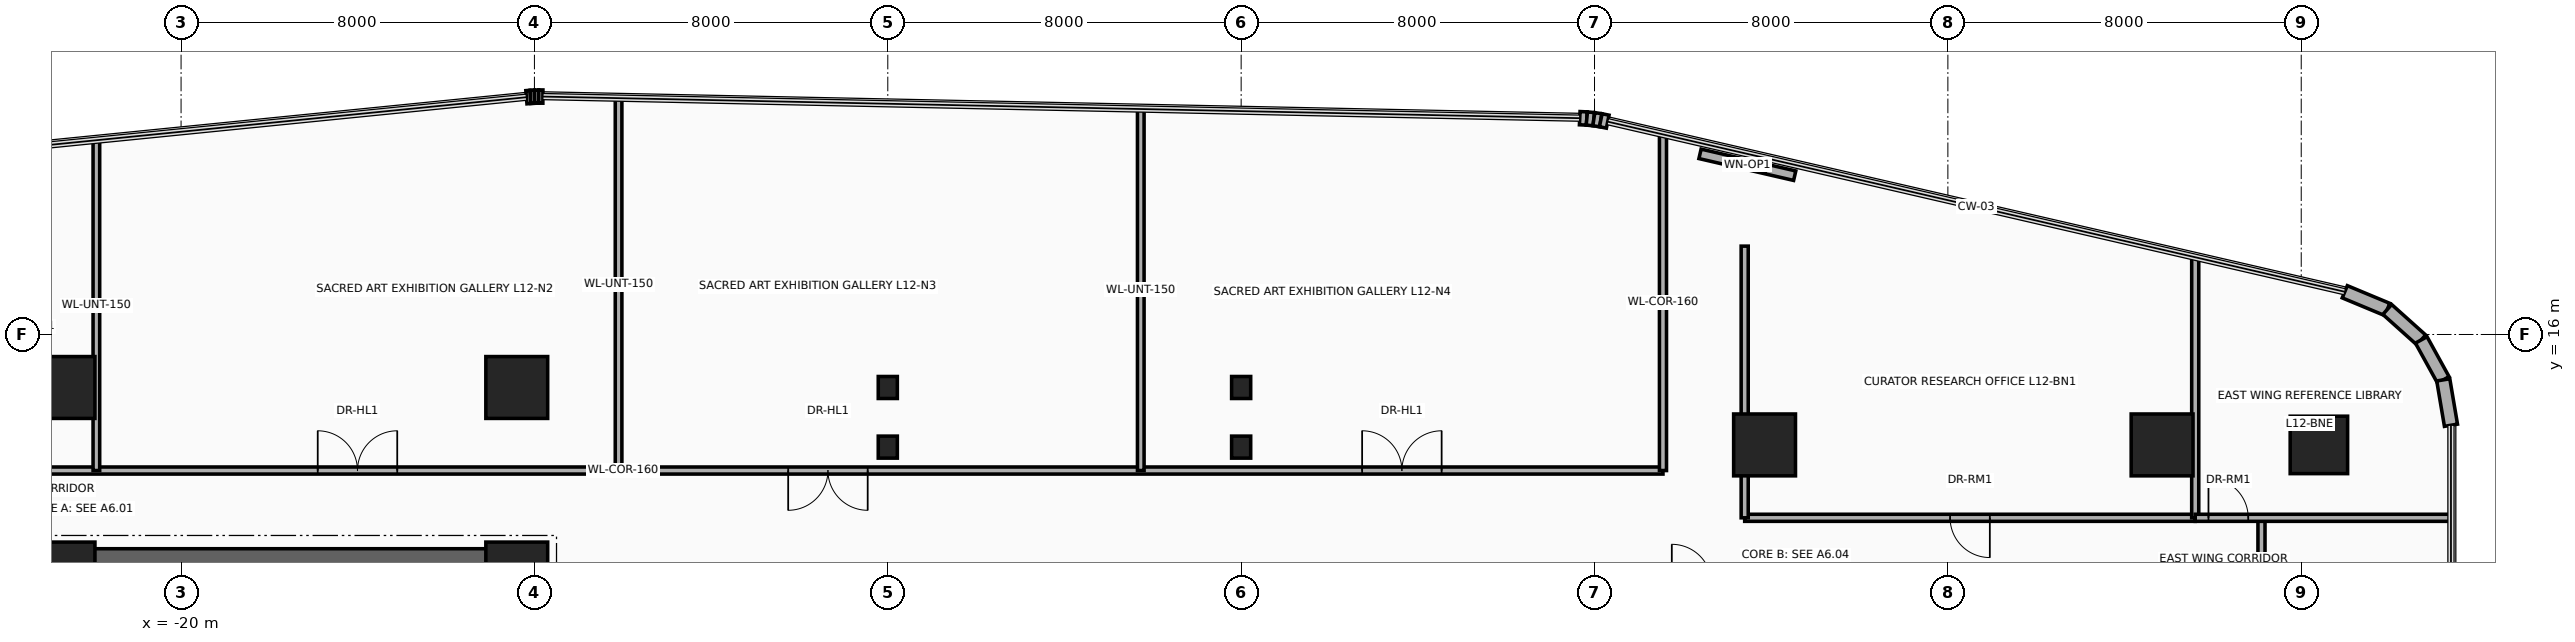
"""IFC4 building model, lengths in metres.
Left out: names, types, materials, properties, quantities, classifications, styles, units other than length and angle.
Written with IfcOpenShell. Run it as: python <this file> out.ifc"""

import sys

from ifc_helpers import new_model, si_unit, direction, frame, frame_2d, origin, origin_2d, place, context, subcontext, project, spatial, rectangle, circle, i_section, extrude, source, transform, mapped, element, fill, save


model = new_model("IFC4")
c1 = context("Model", 3, precision=1e-05, world=origin(), true_north=direction((0.0, 1.0)))
c2 = subcontext(c1, "Body", "Model", "MODEL_VIEW")
j1 = project(units=[si_unit("LENGTHUNIT", "METRE"), si_unit("PLANEANGLEUNIT", "RADIAN")], contexts=[c1])
p1 = place(None, origin())
s1 = spatial("IfcSite", under=j1, at=p1, CompositionType="ELEMENT")
p2 = place(p1, origin())
s2 = spatial("IfcBuilding", under=s1, at=p2, CompositionType="ELEMENT")
p3 = place(p2, frame((0.0, 0.0, 51.9)))
s3 = spatial("IfcBuildingStorey", under=s2, at=p3, CompositionType="ELEMENT", Elevation=51.9)
p4 = place(p3, frame((-22.65, -11.15, 0.0), z_axis=(0.0, 0.0, 1.0), x_axis=(0.0, 1.0, 0.0)))
e1 = element("IfcWall", 1, at=p4, inside=s3, PredefinedType="SHEAR", context=c2, shape_type="SweptSolid", body=[
    extrude(rectangle(XDim=22.3, YDim=0.7, at=frame_2d((11.15, 0.0))), origin(), (0.0, 0.0, 1.0), 3.46),
])
p5 = place(p3, frame((-22.65, 10.8, 0.0), z_axis=(0.0, 0.0, 1.0), x_axis=(1.0, 0.0, 0.0)))
e2 = element("IfcWall", 2, at=p5, inside=s3, PredefinedType="SHEAR", context=c2, shape_type="SweptSolid", body=[
    extrude(rectangle(XDim=10.25, YDim=0.7, at=frame_2d((5.125, 0.0))), origin(), (0.0, 0.0, 1.0), 3.46),
])
m1 = source(origin(), c2, "Body", "SweptSolid", [
    extrude(rectangle(XDim=1.4, YDim=1.4, at=origin_2d()), origin(), (0.0, 0.0, 1.0), 3.7),
])
for number, where, z_axis, x_axis in (
    (3, (-22.65, 10.6, 0.0), (0.0, 0.0, 1.0), (1.0, 0.0, 0.0)),
    (4, (-12.4, 10.6, 0.0), (0.0, 0.0, 1.0), (1.0, 0.0, 0.0)),
    (5, (-22.65, 14.8, 0.0), (0.0, 0.0, 1.0), (1.0, 0.0, 0.0)),
    (6, (-12.4, 14.8, 0.0), (0.0, 0.0, 1.0), (1.0, 0.0, 0.0)),
    (7, (15.85, 13.5, 0.0), (0.0, 0.0, 1.0), (1.0, 0.0, 0.0)),
    (8, (24.85, 13.5, 0.0), (0.0, 0.0, 1.0), (1.0, 0.0, 0.0)),
):
    element("IfcColumn", number, at=place(p3, frame(where, z_axis=z_axis, x_axis=x_axis)), inside=s3, PredefinedType="COLUMN", context=c2, shape_type="MappedRepresentation", body=[
        mapped(m1, transform((0.0, 0.0, 0.0), x_axis=(1.0, 0.0, 0.0), y_axis=(0.0, 1.0, 0.0), z_axis=(0.0, 0.0, 1.0), scale=1.0)),
    ])
m2 = source(origin(), c2, "Body", "SweptSolid", [
    extrude(circle(Radius=0.65, at=origin_2d()), origin(), (0.0, 0.0, 1.0), 3.7),
])
p6 = place(p3, frame((28.4, 13.5, 0.0), z_axis=(0.0, 0.0, 1.0), x_axis=(1.0, 0.0, 0.0)))
e9 = element("IfcColumn", 9, at=p6, inside=s3, PredefinedType="COLUMN", context=c2, shape_type="MappedRepresentation", body=[
    mapped(m2, transform((0.0, 0.0, 0.0), x_axis=(1.0, 0.0, 0.0), y_axis=(0.0, 1.0, 0.0), z_axis=(0.0, 0.0, 1.0), scale=1.0)),
])
m3 = source(origin(), c2, "Body", "SweptSolid", [
    extrude(i_section(OverallWidth=0.432, OverallDepth=0.498, WebThickness=0.056, FlangeThickness=0.089, at=origin_2d()), origin(), (0.0, 0.0, 1.0), 3.7),
])
for number, where, z_axis, x_axis in (
    (10, (-4.0, 13.45, 0.0), (0.0, 0.0, 1.0), (1.0, 0.0, 0.0)),
    (11, (-4.0, 14.8, 0.0), (0.0, 0.0, 1.0), (1.0, 0.0, 0.0)),
    (12, (4.0, 13.45, 0.0), (0.0, 0.0, 1.0), (1.0, 0.0, 0.0)),
    (13, (4.0, 14.8, 0.0), (0.0, 0.0, 1.0), (1.0, 0.0, 0.0)),
):
    element("IfcColumn", number, at=place(p3, frame(where, z_axis=z_axis, x_axis=x_axis)), inside=s3, PredefinedType="COLUMN", context=c2, shape_type="MappedRepresentation", body=[
        mapped(m3, transform((0.0, 0.0, 0.0), x_axis=(1.0, 0.0, 0.0), y_axis=(0.0, 1.0, 0.0), z_axis=(0.0, 0.0, 1.0), scale=1.0)),
    ])
p7 = place(p3, frame((-12.182, 21.371, 0.0), z_axis=(0.0, 0.0, 1.0), x_axis=(0.996527790842, 0.08326080759, 0.0)))
e14 = element("IfcWall", 14, at=p7, inside=s3, PredefinedType="SOLIDWALL", context=c2, shape_type="SweptSolid", body=[
    extrude(rectangle(XDim=0.094, YDim=0.3, at=frame_2d((0.047, 0.0))), origin(), (0.0, 0.0, 1.0), 3.46),
])
p8 = place(p3, frame((-12.088, 21.379, 0.0), z_axis=(0.0, 0.0, 1.0), x_axis=(0.998476480444, 0.055178963393, 0.0)))
e15 = element("IfcWall", 15, at=p8, inside=s3, PredefinedType="SOLIDWALL", context=c2, shape_type="SweptSolid", body=[
    extrude(rectangle(XDim=0.093, YDim=0.3, at=frame_2d((0.046, 0.0))), origin(), (0.0, 0.0, 1.0), 3.46),
])
p9 = place(p3, frame((-11.996, 21.384, 0.0), z_axis=(0.0, 0.0, 1.0), x_axis=(0.999722573757, 0.023553673204, 0.0)))
e16 = element("IfcWall", 16, at=p9, inside=s3, PredefinedType="SOLIDWALL", context=c2, shape_type="SweptSolid", body=[
    extrude(rectangle(XDim=0.093, YDim=0.3, at=frame_2d((0.047, 0.0))), origin(), (0.0, 0.0, 1.0), 3.46),
])
p10 = place(p3, frame((-11.902, 21.386, 0.0), z_axis=(0.0, 0.0, 1.0), x_axis=(0.999986507273, -0.005194735103, 0.0)))
e17 = element("IfcWall", 17, at=p10, inside=s3, PredefinedType="SOLIDWALL", context=c2, shape_type="SweptSolid", body=[
    extrude(rectangle(XDim=0.094, YDim=0.3, at=frame_2d((0.047, 0.0))), origin(), (0.0, 0.0, 1.0), 3.46),
])
p11 = place(p3, frame((11.666, 20.897, 0.0), z_axis=(0.0, 0.0, 1.0), x_axis=(0.998885297239, -0.047203421059, 0.0)))
e18 = element("IfcWall", 18, at=p11, inside=s3, PredefinedType="SOLIDWALL", context=c2, shape_type="SweptSolid", body=[
    extrude(rectangle(XDim=0.16, YDim=0.3, at=frame_2d((0.08, 0.0))), origin(), (0.0, 0.0, 1.0), 3.46),
])
p12 = place(p3, frame((11.826, 20.889, 0.0), z_axis=(0.0, 0.0, 1.0), x_axis=(0.995172891136, -0.098137234257, 0.0)))
e19 = element("IfcWall", 19, at=p12, inside=s3, PredefinedType="SOLIDWALL", context=c2, shape_type="SweptSolid", body=[
    extrude(rectangle(XDim=0.159, YDim=0.3, at=frame_2d((0.08, 0.0))), origin(), (0.0, 0.0, 1.0), 3.46),
])
p13 = place(p3, frame((11.984, 20.874, 0.0), z_axis=(0.0, 0.0, 1.0), x_axis=(0.988846069207, -0.148941100486, 0.0)))
e20 = element("IfcWall", 20, at=p13, inside=s3, PredefinedType="SOLIDWALL", context=c2, shape_type="SweptSolid", body=[
    extrude(rectangle(XDim=0.159, YDim=0.3, at=frame_2d((0.08, 0.0))), origin(), (0.0, 0.0, 1.0), 3.46),
])
p14 = place(p3, frame((12.142, 20.85, 0.0), z_axis=(0.0, 0.0, 1.0), x_axis=(0.979991950448, -0.19903712482, 0.0)))
e21 = element("IfcWall", 21, at=p14, inside=s3, PredefinedType="SOLIDWALL", context=c2, shape_type="SweptSolid", body=[
    extrude(rectangle(XDim=0.161, YDim=0.3, at=frame_2d((0.08, 0.0))), origin(), (0.0, 0.0, 1.0), 3.46),
])
p15 = place(p3, frame((14.389, 20.09, 0.0), z_axis=(0.0, 0.0, 1.0), x_axis=(0.974400545997, -0.224818984875, 0.0)))
e22 = element("IfcWall", 22, at=p15, inside=s3, PredefinedType="SOLIDWALL", context=c2, shape_type="SweptSolid", body=[
    extrude(rectangle(XDim=2.2, YDim=0.22, at=frame_2d((1.1, 0.0))), origin(), (0.0, 0.0, 1.0), 3.46),
])
p16 = place(p15, frame((0.65, 0.0, 0.95)))
e23 = element("IfcOpeningElement", 23, at=p16, cuts=e22, PredefinedType="OPENING", context=c2, shape_type="SweptSolid", body=[
    extrude(rectangle(XDim=0.9, YDim=1.3, at=frame_2d((0.45, 0.65))), frame((0.0, 0.125, 0.0), z_axis=(0.0, -1.0, 0.0), x_axis=(1.0, 0.0, 0.0)), (0.0, 0.0, 1.0), 0.25),
])
p17 = place(p3, frame((28.986, 16.967, 0.0), z_axis=(0.0, 0.0, 1.0), x_axis=(0.923083852684, -0.384598753136, 0.0)))
e24 = element("IfcWall", 24, at=p17, inside=s3, PredefinedType="SOLIDWALL", context=c2, shape_type="SweptSolid", body=[
    extrude(rectangle(XDim=1.042, YDim=0.3, at=frame_2d((0.521, 0.0))), origin(), (0.0, 0.0, 1.0), 3.46),
])
p18 = place(p3, frame((29.948, 16.566, 0.0), z_axis=(0.0, 0.0, 1.0), x_axis=(0.744585645533, -0.66752694063, 0.0)))
e25 = element("IfcWall", 25, at=p18, inside=s3, PredefinedType="SOLIDWALL", context=c2, shape_type="SweptSolid", body=[
    extrude(rectangle(XDim=1.033, YDim=0.3, at=frame_2d((0.517, 0.0))), origin(), (0.0, 0.0, 1.0), 3.46),
])
p19 = place(p3, frame((30.717, 15.877, 0.0), z_axis=(0.0, 0.0, 1.0), x_axis=(0.482971098131, -0.875636293429, 0.0)))
e26 = element("IfcWall", 26, at=p19, inside=s3, PredefinedType="SOLIDWALL", context=c2, shape_type="SweptSolid", body=[
    extrude(rectangle(XDim=1.033, YDim=0.3, at=frame_2d((0.516, 0.0))), origin(), (0.0, 0.0, 1.0), 3.46),
])
p20 = place(p3, frame((31.216, 14.973, 0.0), z_axis=(0.0, 0.0, 1.0), x_axis=(0.167019462117, -0.985953598946, 0.0)))
e27 = element("IfcWall", 27, at=p20, inside=s3, PredefinedType="SOLIDWALL", context=c2, shape_type="SweptSolid", body=[
    extrude(rectangle(XDim=1.042, YDim=0.3, at=frame_2d((0.521, 0.0))), origin(), (0.0, 0.0, 1.0), 3.46),
])
p21 = place(p3, frame((-33.54, 12.92, 0.0), z_axis=(0.0, 0.0, 1.0), x_axis=(1.0, 0.0, 0.0)))
e28 = element("IfcWall", 28, at=p21, inside=s3, PredefinedType="PARTITIONING", context=c2, shape_type="SweptSolid", body=[
    extrude(rectangle(XDim=47.09, YDim=0.16, at=frame_2d((23.545, 0.0))), origin(), (0.0, 0.0, 1.0), 2.583),
])
p22 = place(p21, frame((4.911, 0.0, 0.0)))
e29 = element("IfcOpeningElement", 29, at=p22, cuts=e28, PredefinedType="OPENING", context=c2, shape_type="SweptSolid", body=[
    extrude(rectangle(XDim=1.8, YDim=2.15, at=frame_2d((0.9, 1.075))), frame((0.0, 0.095, 0.0), z_axis=(0.0, -1.0, 0.0), x_axis=(1.0, 0.0, 0.0)), (0.0, 0.0, 1.0), 0.19),
])
p23 = place(p21, frame((16.634, 0.0, 0.0)))
e30 = element("IfcOpeningElement", 30, at=p23, cuts=e28, PredefinedType="OPENING", context=c2, shape_type="SweptSolid", body=[
    extrude(rectangle(XDim=1.8, YDim=2.15, at=frame_2d((0.9, 1.075))), frame((0.0, 0.095, 0.0), z_axis=(0.0, -1.0, 0.0), x_axis=(1.0, 0.0, 0.0)), (0.0, 0.0, 1.0), 0.19),
])
p24 = place(p21, frame((27.285, 0.0, 0.0)))
e31 = element("IfcOpeningElement", 31, at=p24, cuts=e28, PredefinedType="OPENING", context=c2, shape_type="SweptSolid", body=[
    extrude(rectangle(XDim=1.8, YDim=2.15, at=frame_2d((0.9, 1.075))), frame((0.0, 0.095, 0.0), z_axis=(0.0, -1.0, 0.0), x_axis=(1.0, 0.0, 0.0)), (0.0, 0.0, 1.0), 0.19),
])
p25 = place(p21, frame((40.279, 0.0, 0.0)))
e32 = element("IfcOpeningElement", 32, at=p25, cuts=e28, PredefinedType="OPENING", context=c2, shape_type="SweptSolid", body=[
    extrude(rectangle(XDim=1.8, YDim=2.15, at=frame_2d((0.9, 1.075))), frame((0.0, 0.095, 0.0), z_axis=(0.0, -1.0, 0.0), x_axis=(1.0, 0.0, 0.0)), (0.0, 0.0, 1.0), 0.19),
])
p26 = place(p3, frame((13.55, 12.92, 0.0), z_axis=(0.0, 0.0, 1.0), x_axis=(0.0, 1.0, 0.0)))
e33 = element("IfcWall", 33, at=p26, inside=s3, PredefinedType="PARTITIONING", context=c2, shape_type="SweptSolid", body=[
    extrude(rectangle(XDim=7.609, YDim=0.16, at=frame_2d((3.805, 0.0))), origin(), (0.0, 0.0, 1.0), 2.583),
])
p27 = place(p3, frame((-21.917, 12.92, 0.0), z_axis=(0.0, 0.0, 1.0), x_axis=(0.0, 1.0, 0.0)))
e34 = element("IfcWall", 34, at=p27, inside=s3, PredefinedType="PARTITIONING", context=c2, shape_type="SweptSolid", body=[
    extrude(rectangle(XDim=7.478, YDim=0.15, at=frame_2d((3.739, 0.0))), origin(), (0.0, 0.0, 1.0), 2.583),
])
p28 = place(p3, frame((-10.095, 12.92, 0.0), z_axis=(0.0, 0.0, 1.0), x_axis=(0.0, 1.0, 0.0)))
e35 = element("IfcWall", 35, at=p28, inside=s3, PredefinedType="PARTITIONING", context=c2, shape_type="SweptSolid", body=[
    extrude(rectangle(XDim=8.43, YDim=0.15, at=frame_2d((4.215, 0.0))), origin(), (0.0, 0.0, 1.0), 2.583),
])
p29 = place(p3, frame((1.728, 12.92, 0.0), z_axis=(0.0, 0.0, 1.0), x_axis=(0.0, 1.0, 0.0)))
e36 = element("IfcWall", 36, at=p29, inside=s3, PredefinedType="PARTITIONING", context=c2, shape_type="SweptSolid", body=[
    extrude(rectangle(XDim=8.184, YDim=0.15, at=frame_2d((4.092, 0.0))), origin(), (0.0, 0.0, 1.0), 2.583),
])
p30 = place(p3, frame((15.4, 11.85, 0.0), z_axis=(0.0, 0.0, 1.0), x_axis=(1.0, 0.0, 0.0)))
e37 = element("IfcWall", 37, at=p30, inside=s3, PredefinedType="PARTITIONING", context=c2, shape_type="SweptSolid", body=[
    extrude(rectangle(XDim=10.2, YDim=0.16, at=frame_2d((5.1, 0.0))), origin(), (0.0, 0.0, 1.0), 2.834),
])
p31 = place(p30, frame((4.65, 0.0, 0.0)))
e38 = element("IfcOpeningElement", 38, at=p31, cuts=e37, PredefinedType="OPENING", context=c2, shape_type="SweptSolid", body=[
    extrude(rectangle(XDim=0.9, YDim=2.1, at=frame_2d((0.45, 1.05))), frame((0.0, 0.095, 0.0), z_axis=(0.0, -1.0, 0.0), x_axis=(1.0, 0.0, 0.0)), (0.0, 0.0, 1.0), 0.19),
])
p32 = place(p3, frame((15.4, 11.85, 0.0), z_axis=(0.0, 0.0, 1.0), x_axis=(0.0, 1.0, 0.0)))
e39 = element("IfcWall", 39, at=p32, inside=s3, PredefinedType="PARTITIONING", context=c2, shape_type="SweptSolid", body=[
    extrude(rectangle(XDim=6.15, YDim=0.16, at=frame_2d((3.075, 0.0))), origin(), (0.0, 0.0, 1.0), 2.583),
])
p33 = place(p3, frame((25.6, 11.85, 0.0), z_axis=(0.0, 0.0, 1.0), x_axis=(0.0, 1.0, 0.0)))
e40 = element("IfcWall", 40, at=p33, inside=s3, PredefinedType="PARTITIONING", context=c2, shape_type="SweptSolid", body=[
    extrude(rectangle(XDim=5.898, YDim=0.16, at=frame_2d((2.949, 0.0))), origin(), (0.0, 0.0, 1.0), 2.583),
])
p34 = place(p3, frame((27.1, -13.89, 0.0), z_axis=(0.0, 0.0, 1.0), x_axis=(0.0, 1.0, 0.0)))
e41 = element("IfcWall", 41, at=p34, inside=s3, PredefinedType="PARTITIONING", context=c2, shape_type="SweptSolid", body=[
    extrude(rectangle(XDim=25.74, YDim=0.16, at=frame_2d((12.87, 0.0))), origin(), (0.0, 0.0, 1.0), 2.583),
])
p35 = place(p34, frame((5.258, 0.0, 0.0)))
e42 = element("IfcOpeningElement", 42, at=p35, cuts=e41, PredefinedType="OPENING", context=c2, shape_type="SweptSolid", body=[
    extrude(rectangle(XDim=1.8, YDim=2.15, at=frame_2d((0.9, 1.075))), frame((0.0, 0.095, 0.0), z_axis=(0.0, -1.0, 0.0), x_axis=(1.0, 0.0, 0.0)), (0.0, 0.0, 1.0), 0.19),
])
p36 = place(p34, frame((18.128, 0.0, 0.0)))
e43 = element("IfcOpeningElement", 43, at=p36, cuts=e41, PredefinedType="OPENING", context=c2, shape_type="SweptSolid", body=[
    extrude(rectangle(XDim=1.8, YDim=2.15, at=frame_2d((0.9, 1.075))), frame((0.0, 0.095, 0.0), z_axis=(0.0, -1.0, 0.0), x_axis=(1.0, 0.0, 0.0)), (0.0, 0.0, 1.0), 0.19),
])
p37 = place(p3, frame((25.6, 11.85, 0.0), z_axis=(0.0, 0.0, 1.0), x_axis=(1.0, 0.0, 0.0)))
e44 = element("IfcWall", 44, at=p37, inside=s3, PredefinedType="PARTITIONING", context=c2, shape_type="SweptSolid", body=[
    extrude(rectangle(XDim=5.79, YDim=0.16, at=frame_2d((2.895, 0.0))), origin(), (0.0, 0.0, 1.0), 2.896),
])
p38 = place(p37, frame((0.3, 0.0, 0.0)))
e45 = element("IfcOpeningElement", 45, at=p38, cuts=e44, PredefinedType="OPENING", context=c2, shape_type="SweptSolid", body=[
    extrude(rectangle(XDim=0.9, YDim=2.1, at=frame_2d((0.45, 1.05))), frame((0.0, 0.095, 0.0), z_axis=(0.0, -1.0, 0.0), x_axis=(1.0, 0.0, 0.0)), (0.0, 0.0, 1.0), 0.19),
])
p39 = place(p16, origin())
e46 = element("IfcWindow", 46, at=p39, inside=s3, PartitioningType="SINGLE_PANEL", PredefinedType="WINDOW", context=c2, shape_type="SweptSolid", body=[
    extrude(rectangle(XDim=0.9, YDim=1.3, at=frame_2d((0.45, 0.65))), frame((0.0, 0.03, 0.0), z_axis=(0.0, -1.0, 0.0), x_axis=(1.0, 0.0, 0.0)), (0.0, 0.0, 1.0), 0.06),
])
fill(e23, e46)
p40 = place(p23, origin())
e47 = element("IfcDoor", 47, at=p40, inside=s3, OperationType="DOUBLE_DOOR_SINGLE_SWING", PredefinedType="DOOR", context=c2, shape_type="SweptSolid", body=[
    extrude(rectangle(XDim=1.8, YDim=2.15, at=frame_2d((0.9, 1.075))), frame((0.0, 0.025, 0.0), z_axis=(0.0, -1.0, 0.0), x_axis=(1.0, 0.0, 0.0)), (0.0, 0.0, 1.0), 0.05),
])
fill(e30, e47)
p41 = place(p24, frame((1.8, 0.0, 0.0), z_axis=(0.0, 0.0, 1.0), x_axis=(-1.0, 0.0, 0.0)))
e48 = element("IfcDoor", 48, at=p41, inside=s3, OperationType="DOUBLE_DOOR_SINGLE_SWING", PredefinedType="DOOR", context=c2, shape_type="SweptSolid", body=[
    extrude(rectangle(XDim=1.8, YDim=2.15, at=frame_2d((0.9, 1.075))), frame((0.0, 0.025, 0.0), z_axis=(0.0, -1.0, 0.0), x_axis=(1.0, 0.0, 0.0)), (0.0, 0.0, 1.0), 0.05),
])
fill(e31, e48)
p42 = place(p25, origin())
e49 = element("IfcDoor", 49, at=p42, inside=s3, OperationType="DOUBLE_DOOR_SINGLE_SWING", PredefinedType="DOOR", context=c2, shape_type="SweptSolid", body=[
    extrude(rectangle(XDim=1.8, YDim=2.15, at=frame_2d((0.9, 1.075))), frame((0.0, 0.025, 0.0), z_axis=(0.0, -1.0, 0.0), x_axis=(1.0, 0.0, 0.0)), (0.0, 0.0, 1.0), 0.05),
])
fill(e32, e49)
p43 = place(p31, frame((0.9, 0.0, 0.0), z_axis=(0.0, 0.0, 1.0), x_axis=(-1.0, 0.0, 0.0)))
e50 = element("IfcDoor", 50, at=p43, inside=s3, OperationType="SINGLE_SWING_LEFT", PredefinedType="DOOR", context=c2, shape_type="SweptSolid", body=[
    extrude(rectangle(XDim=0.9, YDim=2.1, at=frame_2d((0.45, 1.05))), frame((0.0, 0.025, 0.0), z_axis=(0.0, -1.0, 0.0), x_axis=(1.0, 0.0, 0.0)), (0.0, 0.0, 1.0), 0.05),
])
fill(e38, e50)
p44 = place(p38, origin())
e51 = element("IfcDoor", 51, at=p44, inside=s3, OperationType="SINGLE_SWING_LEFT", PredefinedType="DOOR", context=c2, shape_type="SweptSolid", body=[
    extrude(rectangle(XDim=0.9, YDim=2.1, at=frame_2d((0.45, 1.05))), frame((0.0, 0.025, 0.0), z_axis=(0.0, -1.0, 0.0), x_axis=(1.0, 0.0, 0.0)), (0.0, 0.0, 1.0), 0.05),
])
fill(e45, e51)
save(model, sys.argv[1])
